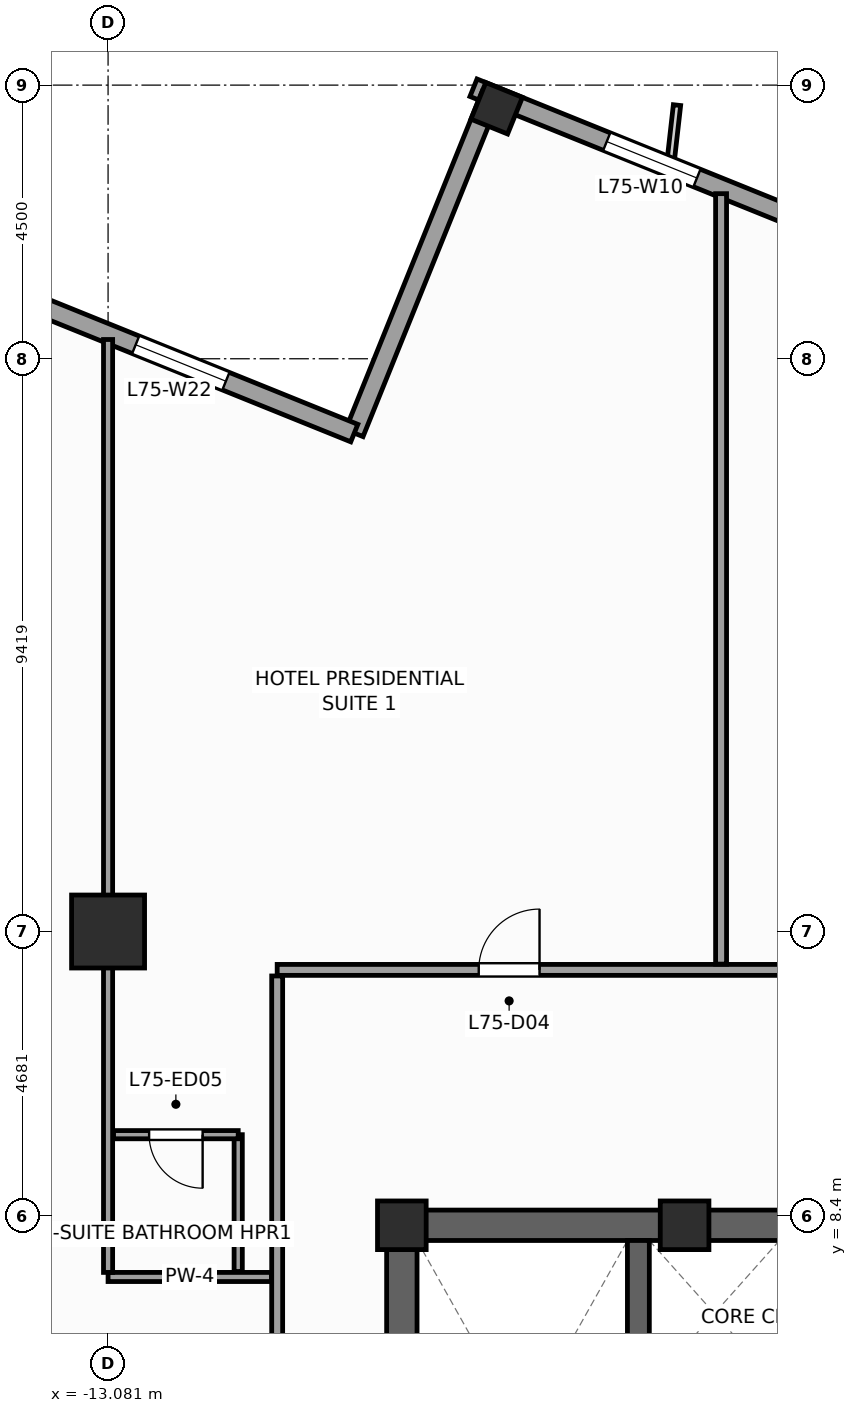
"""IFC4 building model, lengths in metres.
Left out: names, types, materials, properties, quantities, classifications, styles, units other than length and angle.
Written with IfcOpenShell. Run it as: python <this file> out.ifc"""

import sys

from ifc_helpers import new_model, si_unit, direction, frame, frame_2d, origin, origin_2d, place, context, subcontext, project, spatial, rectangle, extrude, source, transform, mapped, element, fill, save


model = new_model("IFC4")
c1 = context("Model", 3, precision=1e-05, world=origin(), true_north=direction((0.0, 1.0)))
c2 = subcontext(c1, "Body", "Model", "MODEL_VIEW")
j1 = project(units=[si_unit("LENGTHUNIT", "METRE"), si_unit("PLANEANGLEUNIT", "RADIAN")], contexts=[c1])
p1 = place(None, origin())
s1 = spatial("IfcSite", under=j1, at=p1, CompositionType="ELEMENT")
p2 = place(p1, origin())
s2 = spatial("IfcBuilding", under=s1, at=p2, CompositionType="ELEMENT")
p3 = place(p2, frame((0.0, 0.0, 304.8)))
s3 = spatial("IfcBuildingStorey", under=s2, at=p3, CompositionType="ELEMENT", Elevation=304.8)
p4 = place(p3, frame((-8.5, 8.25, 0.0), z_axis=(0.0, 0.0, 1.0), x_axis=(1.0, 0.0, 0.0)))
e1 = element("IfcWall", 1, at=p4, inside=s3, PredefinedType="SHEAR", context=c2, shape_type="SweptSolid", body=[
    extrude(rectangle(XDim=17.0, YDim=0.5, at=frame_2d((8.5, 0.0))), origin(), (0.0, 0.0, 1.0), 3.6),
])
p5 = place(p3, frame((-8.25, -8.0, 0.0), z_axis=(0.0, 0.0, 1.0), x_axis=(0.0, 1.0, 0.0)))
e2 = element("IfcWall", 2, at=p5, inside=s3, PredefinedType="SHEAR", context=c2, shape_type="SweptSolid", body=[
    extrude(rectangle(XDim=16.0, YDim=0.5, at=frame_2d((8.0, 0.0))), origin(), (0.0, 0.0, 1.0), 3.6),
])
p6 = place(p5, frame((4.69, 0.0, 0.0)))
e3 = element("IfcOpeningElement", 3, at=p6, cuts=e2, PredefinedType="OPENING", context=c2, shape_type="SweptSolid", body=[
    extrude(rectangle(XDim=1.3, YDim=2.2, at=frame_2d((0.65, 1.1))), frame((0.0, 0.26, 0.0), z_axis=(0.0, -1.0, 0.0), x_axis=(1.0, 0.0, 0.0)), (0.0, 0.0, 1.0), 0.52),
])
p7 = place(p3, frame((-4.36, -8.0, 0.0), z_axis=(0.0, 0.0, 1.0), x_axis=(0.0, 1.0, 0.0)))
e4 = element("IfcWall", 4, at=p7, inside=s3, PredefinedType="SHEAR", context=c2, shape_type="SweptSolid", body=[
    extrude(rectangle(XDim=16.0, YDim=0.36, at=frame_2d((8.0, 0.0))), origin(), (0.0, 0.0, 1.0), 3.6),
])
m1 = source(origin(), c2, "Body", "SweptSolid", [
    extrude(rectangle(XDim=0.8, YDim=0.8, at=origin_2d()), origin(), (0.0, 0.0, 1.0), 3.6),
])
for number, where, z_axis, x_axis in (
    (5, (-8.25, 8.25, 0.0), (0.0, 0.0, 1.0), (1.0, 0.0, 0.0)),
    (6, (-3.6, 8.25, 0.0), (0.0, 0.0, 1.0), (1.0, 0.0, 0.0)),
):
    element("IfcColumn", number, at=place(p3, frame(where, z_axis=z_axis, x_axis=x_axis)), inside=s3, PredefinedType="PILASTER", context=c2, shape_type="MappedRepresentation", body=[
        mapped(m1, transform((0.0, 0.0, 0.0), scale=1.0)),
    ])
m2 = source(origin(), c2, "Body", "SweptSolid", [
    extrude(rectangle(XDim=1.2, YDim=1.2, at=origin_2d()), origin(), (0.0, 0.0, 1.0), 3.6),
])
p8 = place(p3, frame((-13.081, 13.081, 0.0), z_axis=(0.0, 0.0, 1.0), x_axis=(1.0, 0.0, 0.0)))
e7 = element("IfcColumn", 7, at=p8, inside=s3, PredefinedType="COLUMN", context=c2, shape_type="MappedRepresentation", body=[
    mapped(m2, transform((0.0, 0.0, 0.0), scale=1.0)),
])
m3 = source(origin(), c2, "Body", "SweptSolid", [
    extrude(rectangle(XDim=0.65, YDim=0.65, at=origin_2d()), origin(), (0.0, 0.0, 1.0), 3.6),
])
p9 = place(p3, frame((-6.69, 26.62, 0.0), z_axis=(0.0, 0.0, 1.0), x_axis=(0.374606593416, 0.927183854567, 0.0)))
e8 = element("IfcColumn", 8, at=p9, inside=s3, PredefinedType="COLUMN", context=c2, shape_type="MappedRepresentation", body=[
    mapped(m3, transform((0.0, 0.0, 0.0), scale=1.0)),
])
p10 = place(p3, frame((23.813, 14.479, 0.0), z_axis=(0.0, 0.0, 1.0), x_axis=(-0.927182657188, 0.374609557019, 0.0)))
e9 = element("IfcWall", 9, at=p10, inside=s3, PredefinedType="STANDARD", context=c2, shape_type="SweptSolid", body=[
    extrude(rectangle(XDim=33.31, YDim=0.31, at=frame_2d((16.655, 0.0))), origin(), (0.0, 0.0, 1.0), 2.75),
])
p11 = place(p10, frame((3.197, 0.0, 0.47)))
e10 = element("IfcOpeningElement", 10, at=p11, cuts=e9, PredefinedType="OPENING", context=c2, shape_type="SweptSolid", body=[
    extrude(rectangle(XDim=1.6, YDim=2.1, at=frame_2d((0.8, 1.05))), frame((0.0, 0.165, 0.0), z_axis=(0.0, -1.0, 0.0), x_axis=(1.0, 0.0, 0.0)), (0.0, 0.0, 1.0), 0.33),
])
p12 = place(p10, frame((8.86, 0.0, 0.47)))
e11 = element("IfcOpeningElement", 11, at=p12, cuts=e9, PredefinedType="OPENING", context=c2, shape_type="SweptSolid", body=[
    extrude(rectangle(XDim=1.6, YDim=2.1, at=frame_2d((0.8, 1.05))), frame((0.0, 0.165, 0.0), z_axis=(0.0, -1.0, 0.0), x_axis=(1.0, 0.0, 0.0)), (0.0, 0.0, 1.0), 0.33),
])
p13 = place(p10, frame((14.439, 0.0, 0.47)))
e12 = element("IfcOpeningElement", 12, at=p13, cuts=e9, PredefinedType="OPENING", context=c2, shape_type="SweptSolid", body=[
    extrude(rectangle(XDim=1.6, YDim=2.1, at=frame_2d((0.8, 1.05))), frame((0.0, 0.165, 0.0), z_axis=(0.0, -1.0, 0.0), x_axis=(1.0, 0.0, 0.0)), (0.0, 0.0, 1.0), 0.33),
])
p14 = place(p10, frame((22.601, 0.0, 0.47)))
e13 = element("IfcOpeningElement", 13, at=p14, cuts=e9, PredefinedType="OPENING", context=c2, shape_type="SweptSolid", body=[
    extrude(rectangle(XDim=1.6, YDim=2.1, at=frame_2d((0.8, 1.05))), frame((0.0, 0.165, 0.0), z_axis=(0.0, -1.0, 0.0), x_axis=(1.0, 0.0, 0.0)), (0.0, 0.0, 1.0), 0.33),
])
p15 = place(p10, frame((29.347, 0.0, 0.47)))
e14 = element("IfcOpeningElement", 14, at=p15, cuts=e9, PredefinedType="OPENING", context=c2, shape_type="SweptSolid", body=[
    extrude(rectangle(XDim=1.6, YDim=2.1, at=frame_2d((0.8, 1.05))), frame((0.0, 0.165, 0.0), z_axis=(0.0, -1.0, 0.0), x_axis=(1.0, 0.0, 0.0)), (0.0, 0.0, 1.0), 0.33),
])
p16 = place(p3, frame((-6.784, 26.841, 0.0), z_axis=(0.0, 0.0, 1.0), x_axis=(-0.374636620962, -0.927171722085, 0.0)))
e15 = element("IfcWall", 15, at=p16, inside=s3, PredefinedType="STANDARD", context=c2, shape_type="SweptSolid", body=[
    extrude(rectangle(XDim=6.0, YDim=0.31, at=frame_2d((3.0, 0.0))), origin(), (0.0, 0.0, 1.0), 2.65),
])
p17 = place(p3, frame((-9.032, 21.278, 0.0), z_axis=(0.0, 0.0, 1.0), x_axis=(-0.927185411764, 0.374602739196, 0.0)))
e16 = element("IfcWall", 16, at=p17, inside=s3, PredefinedType="STANDARD", context=c2, shape_type="SweptSolid", body=[
    extrude(rectangle(XDim=6.155, YDim=0.31, at=frame_2d((3.078, 0.0))), origin(), (0.0, 0.0, 1.0), 3.35),
])
p18 = place(p17, frame((2.278, 0.0, 0.47)))
e17 = element("IfcOpeningElement", 17, at=p18, cuts=e16, PredefinedType="OPENING", context=c2, shape_type="SweptSolid", body=[
    extrude(rectangle(XDim=1.6, YDim=2.1, at=frame_2d((0.8, 1.05))), frame((0.0, 0.165, 0.0), z_axis=(0.0, -1.0, 0.0), x_axis=(1.0, 0.0, 0.0)), (0.0, 0.0, 1.0), 0.33),
])
p19 = place(p3, frame((-10.3, 12.45, 0.0), z_axis=(0.0, 0.0, 1.0), x_axis=(1.0, 0.0, 0.0)))
e18 = element("IfcWall", 18, at=p19, inside=s3, PredefinedType="PARTITIONING", context=c2, shape_type="SweptSolid", body=[
    extrude(rectangle(XDim=20.6, YDim=0.18, at=frame_2d((10.3, 0.0))), origin(), (0.0, 0.0, 1.0), 3.35),
])
p20 = place(p19, frame((15.036, 0.0, 0.0)))
e19 = element("IfcOpeningElement", 19, at=p20, cuts=e18, PredefinedType="OPENING", context=c2, shape_type="SweptSolid", body=[
    extrude(rectangle(XDim=0.95, YDim=2.1, at=frame_2d((0.475, 1.05))), frame((0.0, 0.1, 0.0), z_axis=(0.0, -1.0, 0.0), x_axis=(1.0, 0.0, 0.0)), (0.0, 0.0, 1.0), 0.2),
])
p21 = place(p19, frame((3.314, 0.0, 0.0)))
e20 = element("IfcOpeningElement", 20, at=p21, cuts=e18, PredefinedType="OPENING", context=c2, shape_type="SweptSolid", body=[
    extrude(rectangle(XDim=1.0, YDim=2.15, at=frame_2d((0.5, 1.075))), frame((0.0, 0.1, 0.0), z_axis=(0.0, -1.0, 0.0), x_axis=(1.0, 0.0, 0.0)), (0.0, 0.0, 1.0), 0.2),
])
p22 = place(p19, frame((10.05, 0.0, 0.0)))
e21 = element("IfcOpeningElement", 21, at=p22, cuts=e18, PredefinedType="OPENING", context=c2, shape_type="SweptSolid", body=[
    extrude(rectangle(XDim=1.0, YDim=2.15, at=frame_2d((0.5, 1.075))), frame((0.0, 0.1, 0.0), z_axis=(0.0, -1.0, 0.0), x_axis=(1.0, 0.0, 0.0)), (0.0, 0.0, 1.0), 0.2),
])
p23 = place(p3, frame((-10.3, -12.35, 0.0), z_axis=(0.0, 0.0, 1.0), x_axis=(0.0, 1.0, 0.0)))
e22 = element("IfcWall", 22, at=p23, inside=s3, PredefinedType="PARTITIONING", context=c2, shape_type="SweptSolid", body=[
    extrude(rectangle(XDim=24.7, YDim=0.18, at=frame_2d((12.35, 0.0))), origin(), (0.0, 0.0, 1.0), 3.35),
])
p24 = place(p23, frame((16.15, 0.0, 0.0)))
e23 = element("IfcOpeningElement", 23, at=p24, cuts=e22, PredefinedType="OPENING", context=c2, shape_type="SweptSolid", body=[
    extrude(rectangle(XDim=1.0, YDim=2.15, at=frame_2d((0.5, 1.075))), frame((0.0, 0.1, 0.0), z_axis=(0.0, -1.0, 0.0), x_axis=(1.0, 0.0, 0.0)), (0.0, 0.0, 1.0), 0.2),
])
p25 = place(p23, frame((2.139, 0.0, 0.0)))
e24 = element("IfcOpeningElement", 24, at=p25, cuts=e22, PredefinedType="OPENING", context=c2, shape_type="SweptSolid", body=[
    extrude(rectangle(XDim=1.0, YDim=2.15, at=frame_2d((0.5, 1.075))), frame((0.0, 0.1, 0.0), z_axis=(0.0, -1.0, 0.0), x_axis=(1.0, 0.0, 0.0)), (0.0, 0.0, 1.0), 0.2),
])
p26 = place(p23, frame((6.35, 0.0, 0.0)))
e25 = element("IfcOpeningElement", 25, at=p26, cuts=e22, PredefinedType="OPENING", context=c2, shape_type="SweptSolid", body=[
    extrude(rectangle(XDim=1.0, YDim=2.15, at=frame_2d((0.5, 1.075))), frame((0.0, 0.1, 0.0), z_axis=(0.0, -1.0, 0.0), x_axis=(1.0, 0.0, 0.0)), (0.0, 0.0, 1.0), 0.2),
])
p27 = place(p23, frame((10.65, 0.0, 0.0)))
e26 = element("IfcOpeningElement", 26, at=p27, cuts=e22, PredefinedType="OPENING", context=c2, shape_type="SweptSolid", body=[
    extrude(rectangle(XDim=1.0, YDim=2.15, at=frame_2d((0.5, 1.075))), frame((0.0, 0.1, 0.0), z_axis=(0.0, -1.0, 0.0), x_axis=(1.0, 0.0, 0.0)), (0.0, 0.0, 1.0), 0.2),
])
p28 = place(p3, frame((-3.0, 12.545, 0.0), z_axis=(0.0, 0.0, 1.0), x_axis=(0.0, 1.0, 0.0)))
e27 = element("IfcWall", 27, at=p28, inside=s3, PredefinedType="PARTITIONING", context=c2, shape_type="SweptSolid", body=[
    extrude(rectangle(XDim=12.67, YDim=0.18, at=frame_2d((6.335, 0.0))), origin(), (0.0, 0.0, 1.0), 3.02),
])
p29 = place(p3, frame((-10.395, 7.4, 0.0), z_axis=(0.0, 0.0, 1.0), x_axis=(-1.0, 0.0, 0.0)))
e28 = element("IfcWall", 28, at=p29, inside=s3, PredefinedType="PARTITIONING", context=c2, shape_type="SweptSolid", body=[
    extrude(rectangle(XDim=2.686, YDim=0.15, at=frame_2d((1.343, 0.0))), origin(), (0.0, 0.0, 1.0), 3.35),
])
p30 = place(p3, frame((-13.081, 7.475, 0.0), z_axis=(0.0, 0.0, 1.0), x_axis=(0.0, 1.0, 0.0)))
e29 = element("IfcWall", 29, at=p30, inside=s3, PredefinedType="PARTITIONING", context=c2, shape_type="SweptSolid", body=[
    extrude(rectangle(XDim=15.342, YDim=0.15, at=frame_2d((7.671, 0.0))), origin(), (0.0, 0.0, 1.0), 2.45),
])
p31 = place(p3, frame((-10.941, 7.49, 0.0), z_axis=(0.0, 0.0, 1.0), x_axis=(0.0, 1.0, 0.0)))
e30 = element("IfcWall", 30, at=p31, inside=s3, PredefinedType="PARTITIONING", context=c2, shape_type="SweptSolid", body=[
    extrude(rectangle(XDim=2.25, YDim=0.135, at=frame_2d((1.125, 0.0))), origin(), (0.0, 0.0, 1.0), 3.35),
])
p32 = place(p3, frame((-12.991, 9.74, 0.0), z_axis=(0.0, 0.0, 1.0), x_axis=(1.0, 0.0, 0.0)))
e31 = element("IfcWall", 31, at=p32, inside=s3, PredefinedType="PARTITIONING", context=c2, shape_type="SweptSolid", body=[
    extrude(rectangle(XDim=2.05, YDim=0.135, at=frame_2d((1.025, 0.0))), origin(), (0.0, 0.0, 1.0), 3.35),
])
p33 = place(p32, frame((0.585, 0.0, 0.0)))
e32 = element("IfcOpeningElement", 32, at=p33, cuts=e31, PredefinedType="OPENING", context=c2, shape_type="SweptSolid", body=[
    extrude(rectangle(XDim=0.88, YDim=2.1, at=frame_2d((0.44, 1.05))), frame((0.0, 0.078, 0.0), z_axis=(0.0, -1.0, 0.0), x_axis=(1.0, 0.0, 0.0)), (0.0, 0.0, 1.0), 0.155),
])
m4 = source(origin(), c2, "Body", "SweptSolid", [
    extrude(rectangle(XDim=1.6, YDim=2.1, at=frame_2d((0.8, 1.05))), frame((0.0, 0.03, 0.0), z_axis=(0.0, -1.0, 0.0), x_axis=(1.0, 0.0, 0.0)), (0.0, 0.0, 1.0), 0.06),
])
p34 = place(p15, origin())
e33 = element("IfcWindow", 33, at=p34, inside=s3, PartitioningType="SINGLE_PANEL", PredefinedType="WINDOW", context=c2, shape_type="MappedRepresentation", body=[
    mapped(m4, transform((0.0, 0.0, 0.0), scale=1.0)),
])
fill(e14, e33)
p35 = place(p18, origin())
e34 = element("IfcWindow", 34, at=p35, inside=s3, PartitioningType="SINGLE_PANEL", PredefinedType="WINDOW", context=c2, shape_type="MappedRepresentation", body=[
    mapped(m4, transform((0.0, 0.0, 0.0), scale=1.0)),
])
fill(e17, e34)
m5 = source(origin(), c2, "Body", "SweptSolid", [
    extrude(rectangle(XDim=1.0, YDim=2.15, at=frame_2d((0.5, 1.075))), frame((0.0, 0.025, 0.0), z_axis=(0.0, -1.0, 0.0), x_axis=(1.0, 0.0, 0.0)), (0.0, 0.0, 1.0), 0.05),
])
p36 = place(p21, origin())
e35 = element("IfcDoor", 35, at=p36, inside=s3, OperationType="SINGLE_SWING_RIGHT", PredefinedType="DOOR", context=c2, shape_type="MappedRepresentation", body=[
    mapped(m5, transform((0.0, 0.0, 0.0), scale=1.0)),
])
fill(e20, e35)
m6 = source(origin(), c2, "Body", "SweptSolid", [
    extrude(rectangle(XDim=0.88, YDim=2.1, at=frame_2d((0.44, 1.05))), frame((0.0, 0.025, 0.0), z_axis=(0.0, -1.0, 0.0), x_axis=(1.0, 0.0, 0.0)), (0.0, 0.0, 1.0), 0.05),
])
p37 = place(p33, frame((0.88, 0.0, 0.0), z_axis=(0.0, 0.0, 1.0), x_axis=(-1.0, 0.0, 0.0)))
e36 = element("IfcDoor", 36, at=p37, inside=s3, OperationType="SINGLE_SWING_RIGHT", PredefinedType="DOOR", context=c2, shape_type="MappedRepresentation", body=[
    mapped(m6, transform((0.0, 0.0, 0.0), scale=1.0)),
])
fill(e32, e36)
save(model, sys.argv[1])
